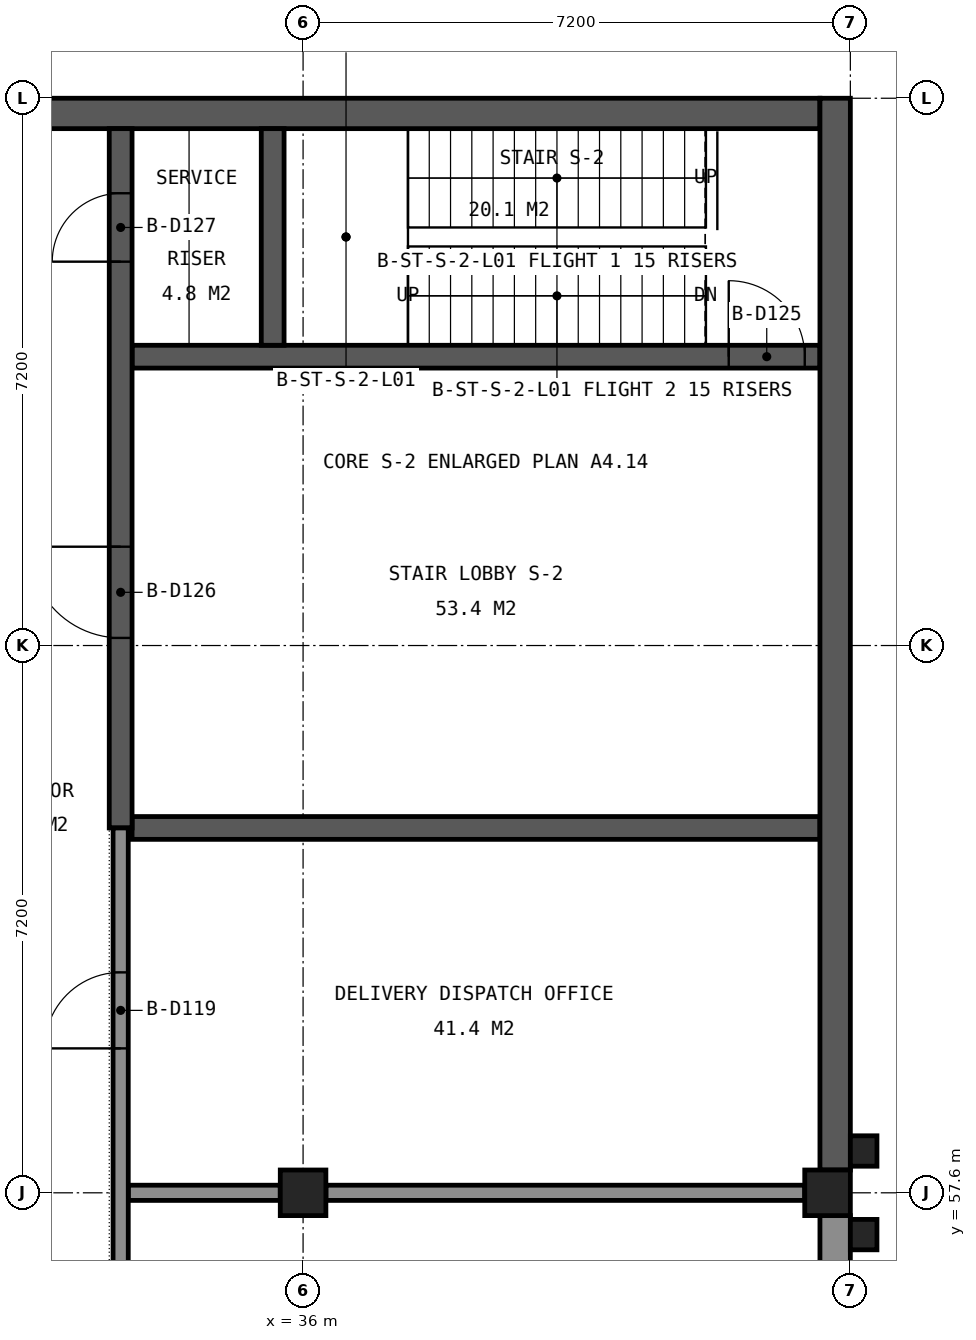
"""IFC4 building model, lengths in metres.
Left out: names, types, materials, properties, quantities, classifications, styles, units other than length and angle.
Written with IfcOpenShell. Run it as: python <this file> out.ifc"""

import sys

from ifc_helpers import new_model, si_unit, direction, frame, frame_2d, origin, origin_2d, place, context, subcontext, project, spatial, rectangle, extrude, element, fill, save


model = new_model("IFC4")
c1 = context("Model", 3, precision=1e-05, world=origin(), true_north=direction((0.0, 1.0)))
c2 = subcontext(c1, "Body", "Model", "MODEL_VIEW")
j1 = project(units=[si_unit("LENGTHUNIT", "METRE"), si_unit("PLANEANGLEUNIT", "RADIAN")], contexts=[c1])
p1 = place(None, origin())
s1 = spatial("IfcSite", under=j1, at=p1, CompositionType="ELEMENT")
p2 = place(p1, origin())
s2 = spatial("IfcBuilding", under=s1, at=p2, CompositionType="ELEMENT")
p3 = place(p2, frame((0.0, 0.0, 9.6)))
s3 = spatial("IfcBuildingStorey", under=s2, at=p3, CompositionType="ELEMENT", Elevation=9.6)
for number, where, z_axis, x_axis in (
    (1, (36.0, 57.6, 0.0), (0.0, 0.0, 1.0), (1.0, 0.0, 0.0)),
    (2, (42.9, 57.6, 0.0), (0.0, 0.0, 1.0), (1.0, 0.0, 0.0)),
):
    element("IfcColumn", number, at=place(p3, frame(where, z_axis=z_axis, x_axis=x_axis)), inside=s3, PredefinedType="COLUMN", context=c2, shape_type="SweptSolid", body=[
        extrude(rectangle(XDim=0.6, YDim=0.6, at=origin_2d()), origin(), (0.0, 0.0, 1.0), 4.8),
    ])
p4 = place(p3, frame((33.75, 62.4, 0.0), z_axis=(0.0, 0.0, 1.0), x_axis=(1.0, 0.0, 0.0)))
e3 = element("IfcWall", 3, at=p4, inside=s3, PredefinedType="SHEAR", context=c2, shape_type="SweptSolid", body=[
    extrude(rectangle(XDim=9.05, YDim=0.3, at=frame_2d((4.525, 0.0))), origin(), (0.0, 0.0, 1.0), 4.55),
])
p5 = place(p3, frame((33.75, 68.6, 0.0), z_axis=(0.0, 0.0, 1.0), x_axis=(1.0, 0.0, 0.0)))
e4 = element("IfcWall", 4, at=p5, inside=s3, PredefinedType="SHEAR", context=c2, shape_type="SweptSolid", body=[
    extrude(rectangle(XDim=9.05, YDim=0.3, at=frame_2d((4.525, 0.0))), origin(), (0.0, 0.0, 1.0), 4.55),
])
p6 = place(p5, frame((7.85, 0.0, 0.0)))
e5 = element("IfcOpeningElement", 5, at=p6, cuts=e4, PredefinedType="OPENING", context=c2, shape_type="SweptSolid", body=[
    extrude(rectangle(XDim=1.0, YDim=2.1, at=frame_2d((0.5, 1.05))), frame((0.0, 0.16, 0.0), z_axis=(0.0, -1.0, 0.0), x_axis=(1.0, 0.0, 0.0)), (0.0, 0.0, 1.0), 0.32),
])
p7 = place(p3, frame((29.1, 71.8, 0.0), z_axis=(0.0, 0.0, 1.0), x_axis=(1.0, 0.0, 0.0)))
e6 = element("IfcWall", 6, at=p7, inside=s3, PredefinedType="SHEAR", context=c2, shape_type="SweptSolid", body=[
    extrude(rectangle(XDim=13.7, YDim=0.4, at=frame_2d((6.85, 0.0))), origin(), (0.0, 0.0, 1.0), 4.55),
])
p8 = place(p3, frame((33.6, 62.4, 0.0), z_axis=(0.0, 0.0, 1.0), x_axis=(0.0, 1.0, 0.0)))
e7 = element("IfcWall", 7, at=p8, inside=s3, PredefinedType="SHEAR", context=c2, shape_type="SweptSolid", body=[
    extrude(rectangle(XDim=9.2, YDim=0.3, at=frame_2d((4.6, 0.0))), origin(), (0.0, 0.0, 1.0), 4.55),
])
p9 = place(p8, frame((2.5, 0.0, 0.0)))
e8 = element("IfcOpeningElement", 8, at=p9, cuts=e7, PredefinedType="OPENING", context=c2, shape_type="SweptSolid", body=[
    extrude(rectangle(XDim=1.2, YDim=2.1, at=frame_2d((0.6, 1.05))), frame((0.0, 0.16, 0.0), z_axis=(0.0, -1.0, 0.0), x_axis=(1.0, 0.0, 0.0)), (0.0, 0.0, 1.0), 0.32),
])
p10 = place(p8, frame((7.45, 0.0, 0.0)))
e9 = element("IfcOpeningElement", 9, at=p10, cuts=e7, PredefinedType="OPENING", context=c2, shape_type="SweptSolid", body=[
    extrude(rectangle(XDim=0.9, YDim=2.1, at=frame_2d((0.45, 1.05))), frame((0.0, 0.16, 0.0), z_axis=(0.0, -1.0, 0.0), x_axis=(1.0, 0.0, 0.0)), (0.0, 0.0, 1.0), 0.32),
])
p11 = place(p3, frame((35.6, 68.75, 0.0), z_axis=(0.0, 0.0, 1.0), x_axis=(0.0, 1.0, 0.0)))
e10 = element("IfcWall", 10, at=p11, inside=s3, PredefinedType="SHEAR", context=c2, shape_type="SweptSolid", body=[
    extrude(rectangle(XDim=2.85, YDim=0.3, at=frame_2d((1.425, 0.0))), origin(), (0.0, 0.0, 1.0), 4.55),
])
p12 = place(p3, frame((43.0, 57.9, 0.0), z_axis=(0.0, 0.0, 1.0), x_axis=(0.0, 1.0, 0.0)))
e11 = element("IfcWall", 11, at=p12, inside=s3, PredefinedType="SHEAR", context=c2, shape_type="SweptSolid", body=[
    extrude(rectangle(XDim=14.1, YDim=0.4, at=frame_2d((7.05, 0.0))), origin(), (0.0, 0.0, 1.0), 4.55),
])
p13 = place(p3, frame((43.0, 50.7, 0.0), z_axis=(0.0, 0.0, 1.0), x_axis=(0.0, 1.0, 0.0)))
e12 = element("IfcWall", 12, at=p13, inside=s3, PredefinedType="SOLIDWALL", context=c2, shape_type="SweptSolid", body=[
    extrude(rectangle(XDim=6.6, YDim=0.4, at=frame_2d((3.3, 0.0))), origin(), (0.0, 0.0, 1.0), 3.95),
])
p14 = place(p13, frame((1.075, 0.0, 0.9)))
e13 = element("IfcOpeningElement", 13, at=p14, cuts=e12, PredefinedType="OPENING", context=c2, shape_type="SweptSolid", body=[
    extrude(rectangle(XDim=0.7, YDim=2.4, at=frame_2d((0.35, 1.2))), frame((0.0, 0.21, 0.0), z_axis=(0.0, -1.0, 0.0), x_axis=(1.0, 0.0, 0.0)), (0.0, 0.0, 1.0), 0.42),
])
p15 = place(p13, frame((1.975, 0.0, 0.9)))
e14 = element("IfcOpeningElement", 14, at=p15, cuts=e12, PredefinedType="OPENING", context=c2, shape_type="SweptSolid", body=[
    extrude(rectangle(XDim=0.7, YDim=2.4, at=frame_2d((0.35, 1.2))), frame((0.0, 0.21, 0.0), z_axis=(0.0, -1.0, 0.0), x_axis=(1.0, 0.0, 0.0)), (0.0, 0.0, 1.0), 0.42),
])
p16 = place(p13, frame((3.925, 0.0, 0.9)))
e15 = element("IfcOpeningElement", 15, at=p16, cuts=e12, PredefinedType="OPENING", context=c2, shape_type="SweptSolid", body=[
    extrude(rectangle(XDim=0.7, YDim=2.4, at=frame_2d((0.35, 1.2))), frame((0.0, 0.21, 0.0), z_axis=(0.0, -1.0, 0.0), x_axis=(1.0, 0.0, 0.0)), (0.0, 0.0, 1.0), 0.42),
])
p17 = place(p13, frame((4.825, 0.0, 0.9)))
e16 = element("IfcOpeningElement", 16, at=p17, cuts=e12, PredefinedType="OPENING", context=c2, shape_type="SweptSolid", body=[
    extrude(rectangle(XDim=0.7, YDim=2.4, at=frame_2d((0.35, 1.2))), frame((0.0, 0.21, 0.0), z_axis=(0.0, -1.0, 0.0), x_axis=(1.0, 0.0, 0.0)), (0.0, 0.0, 1.0), 0.42),
])
for number, where, z_axis, x_axis in (
    (17, (43.375, 57.05, 0.0), (0.0, 0.0, 1.0), (1.0, 0.0, 0.0)),
    (18, (43.375, 58.15, 0.0), (0.0, 0.0, 1.0), (1.0, 0.0, 0.0)),
):
    element("IfcColumn", number, at=place(p3, frame(where, z_axis=z_axis, x_axis=x_axis)), inside=s3, PredefinedType="COLUMN", context=c2, shape_type="SweptSolid", body=[
        extrude(rectangle(XDim=0.35, YDim=0.4, at=origin_2d()), origin(), (0.0, 0.0, 1.0), 4.8),
    ])
p18 = place(p3, frame((43.275, 51.15, -0.15), z_axis=(0.0, 0.0, 1.0), x_axis=(0.0, 1.0, 0.0)))
e19 = element("IfcWall", 19, at=p18, inside=s3, PredefinedType="SOLIDWALL", context=c2, shape_type="SweptSolid", body=[
    extrude(rectangle(XDim=5.7, YDim=0.15, at=frame_2d((2.85, 0.0))), origin(), (0.0, 0.0, 1.0), 0.3),
])
p19 = place(p3, frame((43.275, 57.25, -0.15), z_axis=(0.0, 0.0, 1.0), x_axis=(0.0, 1.0, 0.0)))
e20 = element("IfcWall", 20, at=p19, inside=s3, PredefinedType="SOLIDWALL", context=c2, shape_type="SweptSolid", body=[
    extrude(rectangle(XDim=0.7, YDim=0.15, at=frame_2d((0.35, 0.0))), origin(), (0.0, 0.0, 1.0), 0.3),
])
p20 = place(p3, frame((43.275, 58.35, -0.15), z_axis=(0.0, 0.0, 1.0), x_axis=(0.0, 1.0, 0.0)))
e21 = element("IfcWall", 21, at=p20, inside=s3, PredefinedType="SOLIDWALL", context=c2, shape_type="SweptSolid", body=[
    extrude(rectangle(XDim=13.65, YDim=0.15, at=frame_2d((6.825, 0.0))), origin(), (0.0, 0.0, 1.0), 0.3),
])
p21 = place(p3, frame((33.7, 57.6, 0.0), z_axis=(0.0, 0.0, 1.0), x_axis=(1.0, 0.0, 0.0)))
e22 = element("IfcWall", 22, at=p21, inside=s3, PredefinedType="PARTITIONING", context=c2, shape_type="SweptSolid", body=[
    extrude(rectangle(XDim=2.0, YDim=0.2, at=frame_2d((1.0, 0.0))), origin(), (0.0, 0.0, 1.0), 3.95),
])
p22 = place(p3, frame((36.3, 57.6, 0.0), z_axis=(0.0, 0.0, 1.0), x_axis=(1.0, 0.0, 0.0)))
e23 = element("IfcWall", 23, at=p22, inside=s3, PredefinedType="PARTITIONING", context=c2, shape_type="SweptSolid", body=[
    extrude(rectangle(XDim=6.3, YDim=0.2, at=frame_2d((3.15, 0.0))), origin(), (0.0, 0.0, 1.0), 3.95),
])
p23 = place(p3, frame((33.6, 38.4, 0.0), z_axis=(0.0, 0.0, 1.0), x_axis=(0.0, 1.0, 0.0)))
e24 = element("IfcWall", 24, at=p23, inside=s3, PredefinedType="PARTITIONING", context=c2, shape_type="SweptSolid", body=[
    extrude(rectangle(XDim=24.0, YDim=0.2, at=frame_2d((12.0, 0.0))), origin(), (0.0, 0.0, 1.0), 3.95),
])
p24 = place(p23, frame((3.1, 0.0, 0.0)))
e25 = element("IfcOpeningElement", 25, at=p24, cuts=e24, PredefinedType="OPENING", context=c2, shape_type="SweptSolid", body=[
    extrude(rectangle(XDim=1.0, YDim=2.1, at=frame_2d((0.5, 1.05))), frame((0.0, 0.11, 0.0), z_axis=(0.0, -1.0, 0.0), x_axis=(1.0, 0.0, 0.0)), (0.0, 0.0, 1.0), 0.22),
])
p25 = place(p23, frame((12.3, 0.0, 0.0)))
e26 = element("IfcOpeningElement", 26, at=p25, cuts=e24, PredefinedType="OPENING", context=c2, shape_type="SweptSolid", body=[
    extrude(rectangle(XDim=1.8, YDim=2.1, at=frame_2d((0.9, 1.05))), frame((0.0, 0.11, 0.0), z_axis=(0.0, -1.0, 0.0), x_axis=(1.0, 0.0, 0.0)), (0.0, 0.0, 1.0), 0.22),
])
p26 = place(p23, frame((21.1, 0.0, 0.0)))
e27 = element("IfcOpeningElement", 27, at=p26, cuts=e24, PredefinedType="OPENING", context=c2, shape_type="SweptSolid", body=[
    extrude(rectangle(XDim=1.0, YDim=2.1, at=frame_2d((0.5, 1.05))), frame((0.0, 0.11, 0.0), z_axis=(0.0, -1.0, 0.0), x_axis=(1.0, 0.0, 0.0)), (0.0, 0.0, 1.0), 0.22),
])
p27 = place(p26, origin())
e28 = element("IfcDoor", 28, at=p27, inside=s3, OperationType="SINGLE_SWING_LEFT", PredefinedType="DOOR", context=c2, shape_type="SweptSolid", body=[
    extrude(rectangle(XDim=1.0, YDim=2.1, at=frame_2d((0.5, 1.05))), frame((0.0, 0.025, 0.0), z_axis=(0.0, -1.0, 0.0), x_axis=(1.0, 0.0, 0.0)), (0.0, 0.0, 1.0), 0.05),
])
fill(e27, e28)
p28 = place(p6, origin())
e29 = element("IfcDoor", 29, at=p28, inside=s3, OperationType="SINGLE_SWING_LEFT", PredefinedType="DOOR", context=c2, shape_type="SweptSolid", body=[
    extrude(rectangle(XDim=1.0, YDim=2.1, at=frame_2d((0.5, 1.05))), frame((0.0, 0.025, 0.0), z_axis=(0.0, -1.0, 0.0), x_axis=(1.0, 0.0, 0.0)), (0.0, 0.0, 1.0), 0.05),
])
fill(e5, e29)
p29 = place(p9, origin())
e30 = element("IfcDoor", 30, at=p29, inside=s3, OperationType="SINGLE_SWING_RIGHT", PredefinedType="DOOR", context=c2, shape_type="SweptSolid", body=[
    extrude(rectangle(XDim=1.2, YDim=2.1, at=frame_2d((0.6, 1.05))), frame((0.0, 0.025, 0.0), z_axis=(0.0, -1.0, 0.0), x_axis=(1.0, 0.0, 0.0)), (0.0, 0.0, 1.0), 0.05),
])
fill(e8, e30)
p30 = place(p10, origin())
e31 = element("IfcDoor", 31, at=p30, inside=s3, OperationType="SINGLE_SWING_LEFT", PredefinedType="DOOR", context=c2, shape_type="SweptSolid", body=[
    extrude(rectangle(XDim=0.9, YDim=2.1, at=frame_2d((0.45, 1.05))), frame((0.0, 0.025, 0.0), z_axis=(0.0, -1.0, 0.0), x_axis=(1.0, 0.0, 0.0)), (0.0, 0.0, 1.0), 0.05),
])
fill(e9, e31)
save(model, sys.argv[1])
